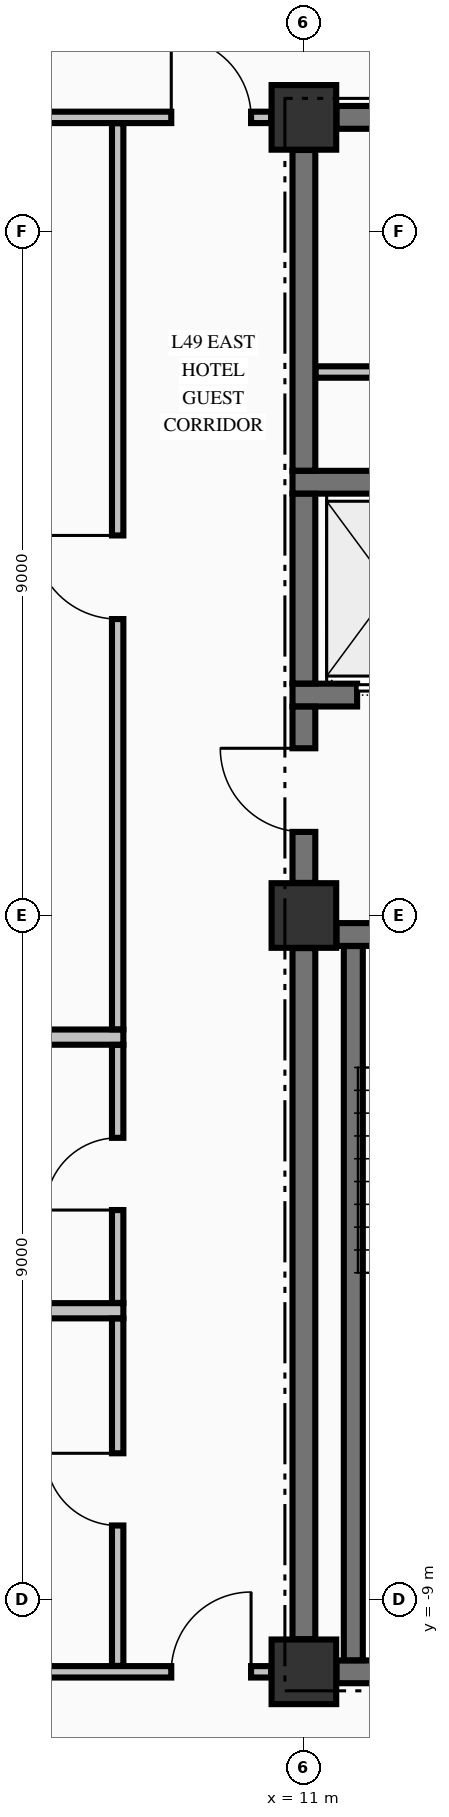
"""IFC4 building model, lengths in metres.
Left out: names, types, materials, properties, quantities, classifications, styles, units other than length and angle.
Written with IfcOpenShell. Run it as: python <this file> out.ifc"""

import sys

from ifc_helpers import new_model, si_unit, direction, frame, frame_2d, origin, origin_2d, place, context, subcontext, project, spatial, rectangle, extrude, element, fill, save


model = new_model("IFC4")
c1 = context("Model", 3, precision=1e-05, world=origin(), true_north=direction((0.0, 1.0)))
c2 = subcontext(c1, "Body", "Model", "MODEL_VIEW")
j1 = project(units=[si_unit("LENGTHUNIT", "METRE"), si_unit("PLANEANGLEUNIT", "RADIAN")], contexts=[c1])
p1 = place(None, origin())
s1 = spatial("IfcSite", under=j1, at=p1, CompositionType="ELEMENT")
p2 = place(p1, origin())
s2 = spatial("IfcBuilding", under=s1, at=p2, CompositionType="ELEMENT")
p3 = place(p2, frame((0.0, 0.0, 191.46)))
s3 = spatial("IfcBuildingStorey", under=s2, at=p3, CompositionType="ELEMENT", Elevation=191.46)
for number, where, z_axis, x_axis in (
    (1, (11.0, -9.95, -0.425), (0.0, 0.0, 1.0), (1.0, 0.0, 0.0)),
    (2, (11.0, 0.0, -0.425), (0.0, 0.0, 1.0), (1.0, 0.0, 0.0)),
    (3, (11.0, 10.5, -0.425), (0.0, 0.0, 1.0), (1.0, 0.0, 0.0)),
):
    element("IfcColumn", number, at=place(p3, frame(where, z_axis=z_axis, x_axis=x_axis)), inside=s3, PredefinedType="COLUMN", context=c2, shape_type="SweptSolid", body=[
        extrude(rectangle(XDim=0.85, YDim=0.85, at=origin_2d()), origin(), (0.0, 0.0, 1.0), 3.55),
    ])
p4 = place(p3, frame((11.429, -9.95, 0.0), z_axis=(0.0, 0.0, 1.0), x_axis=(1.0, 0.0, 0.0)))
e4 = element("IfcWall", 4, at=p4, inside=s3, PredefinedType="SHEAR", context=c2, shape_type="SweptSolid", body=[
    extrude(rectangle(XDim=3.271, YDim=0.3, at=frame_2d((1.635, 0.0))), origin(), (0.0, 0.0, 1.0), 3.125),
])
p5 = place(p3, frame((11.429, -0.25, 0.0), z_axis=(0.0, 0.0, 1.0), x_axis=(1.0, 0.0, 0.0)))
e5 = element("IfcWall", 5, at=p5, inside=s3, PredefinedType="SHEAR", context=c2, shape_type="SweptSolid", body=[
    extrude(rectangle(XDim=3.446, YDim=0.3, at=frame_2d((1.723, 0.0))), origin(), (0.0, 0.0, 1.0), 3.125),
])
p6 = place(p5, frame((1.171, 0.0, 0.0)))
e6 = element("IfcOpeningElement", 6, at=p6, cuts=e5, PredefinedType="OPENING", context=c2, shape_type="SweptSolid", body=[
    extrude(rectangle(XDim=1.1, YDim=2.15, at=frame_2d((0.55, 1.075))), frame((0.0, 0.16, 0.0), z_axis=(0.0, -1.0, 0.0), x_axis=(1.0, 0.0, 0.0)), (0.0, 0.0, 1.0), 0.32),
])
p7 = place(p3, frame((10.85, 2.9, 0.0), z_axis=(0.0, 0.0, 1.0), x_axis=(1.0, 0.0, 0.0)))
e7 = element("IfcWall", 7, at=p7, inside=s3, PredefinedType="SHEAR", context=c2, shape_type="SweptSolid", body=[
    extrude(rectangle(XDim=4.025, YDim=0.3, at=frame_2d((2.012, 0.0))), origin(), (0.0, 0.0, 1.0), 3.125),
])
p8 = place(p7, frame((0.85, 0.0, 0.0)))
e8 = element("IfcOpeningElement", 8, at=p8, cuts=e7, PredefinedType="OPENING", context=c2, shape_type="SweptSolid", body=[
    extrude(rectangle(XDim=1.1, YDim=2.2, at=frame_2d((0.55, 1.1))), frame((0.0, 0.16, 0.0), z_axis=(0.0, -1.0, 0.0), x_axis=(1.0, 0.0, 0.0)), (0.0, 0.0, 1.0), 0.32),
])
p9 = place(p3, frame((10.85, 5.7, 0.0), z_axis=(0.0, 0.0, 1.0), x_axis=(1.0, 0.0, 0.0)))
e9 = element("IfcWall", 9, at=p9, inside=s3, PredefinedType="SHEAR", context=c2, shape_type="SweptSolid", body=[
    extrude(rectangle(XDim=4.025, YDim=0.3, at=frame_2d((2.012, 0.0))), origin(), (0.0, 0.0, 1.0), 3.125),
])
p10 = place(p3, frame((11.429, 10.5, 0.0), z_axis=(0.0, 0.0, 1.0), x_axis=(1.0, 0.0, 0.0)))
e10 = element("IfcWall", 10, at=p10, inside=s3, PredefinedType="SHEAR", context=c2, shape_type="SweptSolid", body=[
    extrude(rectangle(XDim=3.271, YDim=0.3, at=frame_2d((1.635, 0.0))), origin(), (0.0, 0.0, 1.0), 3.125),
])
p11 = place(p10, frame((2.016, 0.0, 0.0)))
e11 = element("IfcOpeningElement", 11, at=p11, cuts=e10, PredefinedType="OPENING", context=c2, shape_type="SweptSolid", body=[
    extrude(rectangle(XDim=0.95, YDim=2.15, at=frame_2d((0.475, 1.075))), frame((0.0, 0.16, 0.0), z_axis=(0.0, -1.0, 0.0), x_axis=(1.0, 0.0, 0.0)), (0.0, 0.0, 1.0), 0.32),
])
p12 = place(p3, frame((-10.569, -9.95, 0.0), z_axis=(0.0, 0.0, 1.0), x_axis=(1.0, 0.0, 0.0)))
e12 = element("IfcWall", 12, at=p12, inside=s3, PredefinedType="PARTITIONING", context=c2, shape_type="SweptSolid", body=[
    extrude(rectangle(XDim=21.138, YDim=0.15, at=frame_2d((10.569, 0.0))), origin(), (0.0, 0.0, 1.0), 3.125),
])
p13 = place(p12, frame((0.264, 0.0, 0.0)))
e13 = element("IfcOpeningElement", 13, at=p13, cuts=e12, PredefinedType="OPENING", context=c2, shape_type="SweptSolid", body=[
    extrude(rectangle(XDim=1.05, YDim=2.15, at=frame_2d((0.525, 1.075))), frame((0.0, 0.085, 0.0), z_axis=(0.0, -1.0, 0.0), x_axis=(1.0, 0.0, 0.0)), (0.0, 0.0, 1.0), 0.17),
])
p14 = place(p12, frame((19.824, 0.0, 0.0)))
e14 = element("IfcOpeningElement", 14, at=p14, cuts=e12, PredefinedType="OPENING", context=c2, shape_type="SweptSolid", body=[
    extrude(rectangle(XDim=1.05, YDim=2.15, at=frame_2d((0.525, 1.075))), frame((0.0, 0.085, 0.0), z_axis=(0.0, -1.0, 0.0), x_axis=(1.0, 0.0, 0.0)), (0.0, 0.0, 1.0), 0.17),
])
p15 = place(p12, frame((12.874, 0.0, 0.0)))
e15 = element("IfcOpeningElement", 15, at=p15, cuts=e12, PredefinedType="OPENING", context=c2, shape_type="SweptSolid", body=[
    extrude(rectangle(XDim=0.95, YDim=2.15, at=frame_2d((0.475, 1.075))), frame((0.0, 0.085, 0.0), z_axis=(0.0, -1.0, 0.0), x_axis=(1.0, 0.0, 0.0)), (0.0, 0.0, 1.0), 0.17),
])
for number, where, z_axis, x_axis in (
    (16, (-0.1, -5.2, 0.0), (0.0, 0.0, 1.0), (1.0, 0.0, 0.0)),
    (17, (-0.1, -1.6, 0.0), (0.0, 0.0, 1.0), (1.0, 0.0, 0.0)),
):
    element("IfcWall", number, at=place(p3, frame(where, z_axis=z_axis, x_axis=x_axis)), inside=s3, PredefinedType="PARTITIONING", context=c2, shape_type="SweptSolid", body=[
        extrude(rectangle(XDim=8.725, YDim=0.2, at=frame_2d((4.363, 0.0))), origin(), (0.0, 0.0, 1.0), 3.125),
    ])
p16 = place(p3, frame((11.153, 7.15, 0.0), z_axis=(0.0, 0.0, 1.0), x_axis=(1.0, 0.0, 0.0)))
e18 = element("IfcWall", 18, at=p16, inside=s3, PredefinedType="PARTITIONING", context=c2, shape_type="SweptSolid", body=[
    extrude(rectangle(XDim=2.072, YDim=0.15, at=frame_2d((1.036, 0.0))), origin(), (0.0, 0.0, 1.0), 3.125),
])
p17 = place(p3, frame((-10.569, 10.5, 0.0), z_axis=(0.0, 0.0, 1.0), x_axis=(1.0, 0.0, 0.0)))
e19 = element("IfcWall", 19, at=p17, inside=s3, PredefinedType="PARTITIONING", context=c2, shape_type="SweptSolid", body=[
    extrude(rectangle(XDim=21.138, YDim=0.15, at=frame_2d((10.569, 0.0))), origin(), (0.0, 0.0, 1.0), 3.125),
])
p18 = place(p17, frame((0.264, 0.0, 0.0)))
e20 = element("IfcOpeningElement", 20, at=p18, cuts=e19, PredefinedType="OPENING", context=c2, shape_type="SweptSolid", body=[
    extrude(rectangle(XDim=1.05, YDim=2.15, at=frame_2d((0.525, 1.075))), frame((0.0, 0.085, 0.0), z_axis=(0.0, -1.0, 0.0), x_axis=(1.0, 0.0, 0.0)), (0.0, 0.0, 1.0), 0.17),
])
p19 = place(p17, frame((19.824, 0.0, 0.0)))
e21 = element("IfcOpeningElement", 21, at=p19, cuts=e19, PredefinedType="OPENING", context=c2, shape_type="SweptSolid", body=[
    extrude(rectangle(XDim=1.05, YDim=2.15, at=frame_2d((0.525, 1.075))), frame((0.0, 0.085, 0.0), z_axis=(0.0, -1.0, 0.0), x_axis=(1.0, 0.0, 0.0)), (0.0, 0.0, 1.0), 0.17),
])
p20 = place(p3, frame((11.0, -9.521, 0.0), z_axis=(0.0, 0.0, 1.0), x_axis=(0.0, 1.0, 0.0)))
e22 = element("IfcWall", 22, at=p20, inside=s3, PredefinedType="SHEAR", context=c2, shape_type="SweptSolid", body=[
    extrude(rectangle(XDim=9.092, YDim=0.3, at=frame_2d((4.546, 0.0))), origin(), (0.0, 0.0, 1.0), 3.125),
])
p21 = place(p3, frame((11.0, 0.429, 0.0), z_axis=(0.0, 0.0, 1.0), x_axis=(0.0, 1.0, 0.0)))
e23 = element("IfcWall", 23, at=p21, inside=s3, PredefinedType="SHEAR", context=c2, shape_type="SweptSolid", body=[
    extrude(rectangle(XDim=2.319, YDim=0.3, at=frame_2d((1.16, 0.0))), origin(), (0.0, 0.0, 1.0), 3.125),
])
p22 = place(p21, frame((0.671, 0.0, 0.0)))
e24 = element("IfcOpeningElement", 24, at=p22, cuts=e23, PredefinedType="OPENING", context=c2, shape_type="SweptSolid", body=[
    extrude(rectangle(XDim=1.1, YDim=2.15, at=frame_2d((0.55, 1.075))), frame((0.0, 0.16, 0.0), z_axis=(0.0, -1.0, 0.0), x_axis=(1.0, 0.0, 0.0)), (0.0, 0.0, 1.0), 0.32),
])
p23 = place(p3, frame((11.0, 3.052, 0.0), z_axis=(0.0, 0.0, 1.0), x_axis=(0.0, 1.0, 0.0)))
e25 = element("IfcWall", 25, at=p23, inside=s3, PredefinedType="SHEAR", context=c2, shape_type="SweptSolid", body=[
    extrude(rectangle(XDim=2.496, YDim=0.3, at=frame_2d((1.248, 0.0))), origin(), (0.0, 0.0, 1.0), 3.125),
])
p24 = place(p3, frame((11.0, 5.852, 0.0), z_axis=(0.0, 0.0, 1.0), x_axis=(0.0, 1.0, 0.0)))
e26 = element("IfcWall", 26, at=p24, inside=s3, PredefinedType="SHEAR", context=c2, shape_type="SweptSolid", body=[
    extrude(rectangle(XDim=4.219, YDim=0.3, at=frame_2d((2.109, 0.0))), origin(), (0.0, 0.0, 1.0), 3.125),
])
p25 = place(p3, frame((11.65, -9.798, 0.0), z_axis=(0.0, 0.0, 1.0), x_axis=(0.0, 1.0, 0.0)))
e27 = element("IfcWall", 27, at=p25, inside=s3, PredefinedType="SOLIDWALL", context=c2, shape_type="SweptSolid", body=[
    extrude(rectangle(XDim=9.396, YDim=0.25, at=frame_2d((4.698, 0.0))), origin(), (0.0, 0.0, 1.0), 3.125),
])
p26 = place(p3, frame((8.55, -9.872, 0.0), z_axis=(0.0, 0.0, 1.0), x_axis=(0.0, 1.0, 0.0)))
e28 = element("IfcWall", 28, at=p26, inside=s3, PredefinedType="PARTITIONING", context=c2, shape_type="SweptSolid", body=[
    extrude(rectangle(XDim=4.569, YDim=0.15, at=frame_2d((2.285, 0.0))), origin(), (0.0, 0.0, 1.0), 3.125),
])
p27 = place(p26, frame((1.847, 0.0, 0.0)))
e29 = element("IfcOpeningElement", 29, at=p27, cuts=e28, PredefinedType="OPENING", context=c2, shape_type="SweptSolid", body=[
    extrude(rectangle(XDim=0.95, YDim=2.15, at=frame_2d((0.475, 1.075))), frame((0.0, 0.085, 0.0), z_axis=(0.0, -1.0, 0.0), x_axis=(1.0, 0.0, 0.0)), (0.0, 0.0, 1.0), 0.17),
])
p28 = place(p3, frame((8.55, -5.097, 0.0), z_axis=(0.0, 0.0, 1.0), x_axis=(0.0, 1.0, 0.0)))
e30 = element("IfcWall", 30, at=p28, inside=s3, PredefinedType="PARTITIONING", context=c2, shape_type="SweptSolid", body=[
    extrude(rectangle(XDim=3.394, YDim=0.15, at=frame_2d((1.697, 0.0))), origin(), (0.0, 0.0, 1.0), 3.125),
])
p29 = place(p28, frame((1.222, 0.0, 0.0)))
e31 = element("IfcOpeningElement", 31, at=p29, cuts=e30, PredefinedType="OPENING", context=c2, shape_type="SweptSolid", body=[
    extrude(rectangle(XDim=0.95, YDim=2.15, at=frame_2d((0.475, 1.075))), frame((0.0, 0.085, 0.0), z_axis=(0.0, -1.0, 0.0), x_axis=(1.0, 0.0, 0.0)), (0.0, 0.0, 1.0), 0.17),
])
p30 = place(p3, frame((8.55, -1.497, 0.0), z_axis=(0.0, 0.0, 1.0), x_axis=(0.0, 1.0, 0.0)))
e32 = element("IfcWall", 32, at=p30, inside=s3, PredefinedType="PARTITIONING", context=c2, shape_type="SweptSolid", body=[
    extrude(rectangle(XDim=11.919, YDim=0.15, at=frame_2d((5.959, 0.0))), origin(), (0.0, 0.0, 1.0), 3.125),
])
p31 = place(p30, frame((5.397, 0.0, 0.0)))
e33 = element("IfcOpeningElement", 33, at=p31, cuts=e32, PredefinedType="OPENING", context=c2, shape_type="SweptSolid", body=[
    extrude(rectangle(XDim=1.1, YDim=2.15, at=frame_2d((0.55, 1.075))), frame((0.0, 0.085, 0.0), z_axis=(0.0, -1.0, 0.0), x_axis=(1.0, 0.0, 0.0)), (0.0, 0.0, 1.0), 0.17),
])
p32 = place(p22, origin())
e34 = element("IfcDoor", 34, at=p32, inside=s3, OperationType="SINGLE_SWING_RIGHT", PredefinedType="DOOR", context=c2, shape_type="SweptSolid", body=[
    extrude(rectangle(XDim=1.1, YDim=2.15, at=frame_2d((0.55, 1.075))), frame((0.0, 0.025, 0.0), z_axis=(0.0, -1.0, 0.0), x_axis=(1.0, 0.0, 0.0)), (0.0, 0.0, 1.0), 0.05),
])
fill(e24, e34)
p33 = place(p8, origin())
e35 = element("IfcDoor", 35, at=p33, inside=s3, OperationType="SLIDING_TO_RIGHT", PredefinedType="DOOR", context=c2, shape_type="SweptSolid", body=[
    extrude(rectangle(XDim=1.1, YDim=2.2, at=frame_2d((0.55, 1.1))), frame((0.0, 0.025, 0.0), z_axis=(0.0, -1.0, 0.0), x_axis=(1.0, 0.0, 0.0)), (0.0, 0.0, 1.0), 0.05),
])
fill(e8, e35)
p34 = place(p19, origin())
e36 = element("IfcDoor", 36, at=p34, inside=s3, OperationType="SINGLE_SWING_LEFT", PredefinedType="DOOR", context=c2, shape_type="SweptSolid", body=[
    extrude(rectangle(XDim=1.05, YDim=2.15, at=frame_2d((0.525, 1.075))), frame((0.0, 0.025, 0.0), z_axis=(0.0, -1.0, 0.0), x_axis=(1.0, 0.0, 0.0)), (0.0, 0.0, 1.0), 0.05),
])
fill(e21, e36)
p35 = place(p14, origin())
e37 = element("IfcDoor", 37, at=p35, inside=s3, OperationType="SINGLE_SWING_RIGHT", PredefinedType="DOOR", context=c2, shape_type="SweptSolid", body=[
    extrude(rectangle(XDim=1.05, YDim=2.15, at=frame_2d((0.525, 1.075))), frame((0.0, 0.025, 0.0), z_axis=(0.0, -1.0, 0.0), x_axis=(1.0, 0.0, 0.0)), (0.0, 0.0, 1.0), 0.05),
])
fill(e14, e37)
p36 = place(p31, origin())
e38 = element("IfcDoor", 38, at=p36, inside=s3, OperationType="SINGLE_SWING_RIGHT", PredefinedType="DOOR", context=c2, shape_type="SweptSolid", body=[
    extrude(rectangle(XDim=1.1, YDim=2.15, at=frame_2d((0.55, 1.075))), frame((0.0, 0.025, 0.0), z_axis=(0.0, -1.0, 0.0), x_axis=(1.0, 0.0, 0.0)), (0.0, 0.0, 1.0), 0.05),
])
fill(e33, e38)
p37 = place(p29, origin())
e39 = element("IfcDoor", 39, at=p37, inside=s3, OperationType="SINGLE_SWING_LEFT", PredefinedType="DOOR", context=c2, shape_type="SweptSolid", body=[
    extrude(rectangle(XDim=0.95, YDim=2.15, at=frame_2d((0.475, 1.075))), frame((0.0, 0.025, 0.0), z_axis=(0.0, -1.0, 0.0), x_axis=(1.0, 0.0, 0.0)), (0.0, 0.0, 1.0), 0.05),
])
fill(e31, e39)
p38 = place(p27, origin())
e40 = element("IfcDoor", 40, at=p38, inside=s3, OperationType="SINGLE_SWING_RIGHT", PredefinedType="DOOR", context=c2, shape_type="SweptSolid", body=[
    extrude(rectangle(XDim=0.95, YDim=2.15, at=frame_2d((0.475, 1.075))), frame((0.0, 0.025, 0.0), z_axis=(0.0, -1.0, 0.0), x_axis=(1.0, 0.0, 0.0)), (0.0, 0.0, 1.0), 0.05),
])
fill(e29, e40)
save(model, sys.argv[1])
